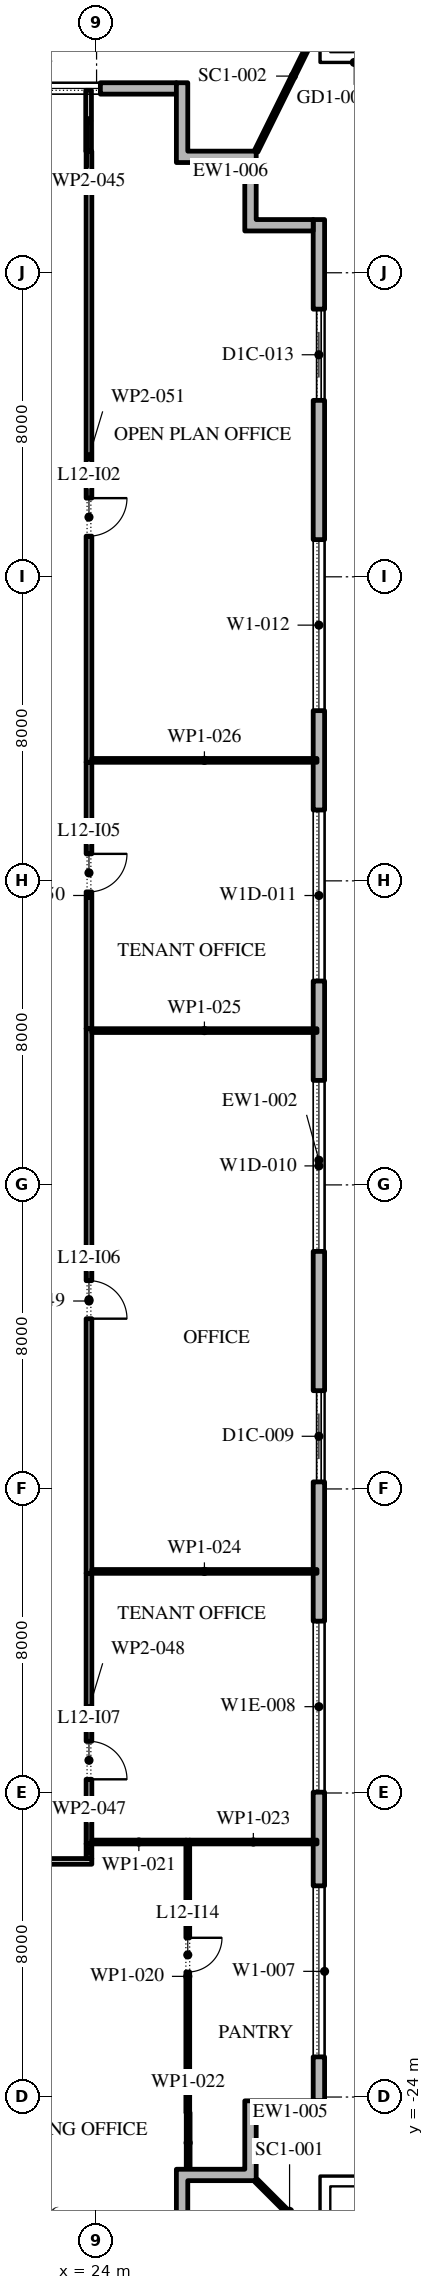
"""IFC4 building model, lengths in metres.
Left out: names, types, materials, properties, quantities, classifications, styles, units other than length and angle.
Written with IfcOpenShell. Run it as: python <this file> out.ifc"""

import sys

from ifc_helpers import new_model, si_unit, direction, frame, frame_2d, origin, place, context, subcontext, project, spatial, polyline, rectangle, outline, extrude, element, fill, save


model = new_model("IFC4")
c1 = context("Model", 3, precision=1e-05, world=origin(), true_north=direction((0.0, 1.0)))
c2 = subcontext(c1, "Body", "Model", "MODEL_VIEW")
j1 = project(units=[si_unit("LENGTHUNIT", "METRE"), si_unit("PLANEANGLEUNIT", "RADIAN")], contexts=[c1])
p1 = place(None, origin())
s1 = spatial("IfcSite", under=j1, at=p1, CompositionType="ELEMENT")
p2 = place(p1, origin())
s2 = spatial("IfcBuilding", under=s1, at=p2, CompositionType="ELEMENT")
p3 = place(p2, frame((0.0, 0.0, 60.6)))
s3 = spatial("IfcBuildingStorey", under=s2, at=p3, CompositionType="ELEMENT", Elevation=60.6)
p4 = place(p3, frame((29.85, -24.1, 0.0), z_axis=(0.0, 0.0, 1.0), x_axis=(0.0, 1.0, 0.0)))
e1 = element("IfcWall", 1, at=p4, inside=s3, PredefinedType="STANDARD", context=c2, shape_type="SweptSolid", body=[
    extrude(rectangle(XDim=49.5, YDim=0.3, at=frame_2d((24.75, 0.0))), origin(), (0.0, 0.0, 1.0), 4.0),
])
p5 = place(p4, frame((1.157, 0.0, 0.45)))
e2 = element("IfcOpeningElement", 2, at=p5, cuts=e1, PredefinedType="OPENING", context=c2, shape_type="SweptSolid", body=[
    extrude(rectangle(XDim=4.5, YDim=3.05, at=frame_2d((2.25, 1.525))), frame((0.0, 0.16, 0.0), z_axis=(0.0, -1.0, 0.0), x_axis=(1.0, 0.0, 0.0)), (0.0, 0.0, 1.0), 0.32),
])
p6 = place(p4, frame((8.121, 0.0, 0.45)))
e3 = element("IfcOpeningElement", 3, at=p6, cuts=e1, PredefinedType="OPENING", context=c2, shape_type="SweptSolid", body=[
    extrude(rectangle(XDim=4.5, YDim=2.825, at=frame_2d((2.25, 1.413))), frame((0.0, 0.16, 0.0), z_axis=(0.0, -1.0, 0.0), x_axis=(1.0, 0.0, 0.0)), (0.0, 0.0, 1.0), 0.32),
])
p7 = place(p4, frame((16.286, 0.0, 0.0)))
e4 = element("IfcOpeningElement", 4, at=p7, cuts=e1, PredefinedType="OPENING", context=c2, shape_type="SweptSolid", body=[
    extrude(rectangle(XDim=2.4, YDim=3.325, at=frame_2d((1.2, 1.663))), frame((0.0, 0.16, 0.0), z_axis=(0.0, -1.0, 0.0), x_axis=(1.0, 0.0, 0.0)), (0.0, 0.0, 1.0), 0.32),
])
p8 = place(p4, frame((22.35, 0.0, 0.45)))
e5 = element("IfcOpeningElement", 5, at=p8, cuts=e1, PredefinedType="OPENING", context=c2, shape_type="SweptSolid", body=[
    extrude(rectangle(XDim=4.5, YDim=2.875, at=frame_2d((2.25, 1.438))), frame((0.0, 0.16, 0.0), z_axis=(0.0, -1.0, 0.0), x_axis=(1.0, 0.0, 0.0)), (0.0, 0.0, 1.0), 0.32),
])
p9 = place(p4, frame((29.464, 0.0, 0.45)))
e6 = element("IfcOpeningElement", 6, at=p9, cuts=e1, PredefinedType="OPENING", context=c2, shape_type="SweptSolid", body=[
    extrude(rectangle(XDim=4.5, YDim=2.875, at=frame_2d((2.25, 1.438))), frame((0.0, 0.16, 0.0), z_axis=(0.0, -1.0, 0.0), x_axis=(1.0, 0.0, 0.0)), (0.0, 0.0, 1.0), 0.32),
])
p10 = place(p4, frame((36.579, 0.0, 0.45)))
e7 = element("IfcOpeningElement", 7, at=p10, cuts=e1, PredefinedType="OPENING", context=c2, shape_type="SweptSolid", body=[
    extrude(rectangle(XDim=4.5, YDim=3.05, at=frame_2d((2.25, 1.525))), frame((0.0, 0.16, 0.0), z_axis=(0.0, -1.0, 0.0), x_axis=(1.0, 0.0, 0.0)), (0.0, 0.0, 1.0), 0.32),
])
p11 = place(p4, frame((44.743, 0.0, 0.0)))
e8 = element("IfcOpeningElement", 8, at=p11, cuts=e1, PredefinedType="OPENING", context=c2, shape_type="SweptSolid", body=[
    extrude(rectangle(XDim=2.4, YDim=3.325, at=frame_2d((1.2, 1.663))), frame((0.0, 0.16, 0.0), z_axis=(0.0, -1.0, 0.0), x_axis=(1.0, 0.0, 0.0)), (0.0, 0.0, 1.0), 0.32),
])
p12 = place(p3, frame((26.1, 28.85, 0.0), z_axis=(0.0, 0.0, 1.0), x_axis=(-1.0, 0.0, 0.0)))
e9 = element("IfcWall", 9, at=p12, inside=s3, PredefinedType="STANDARD", context=c2, shape_type="SweptSolid", body=[
    extrude(rectangle(XDim=52.5, YDim=0.3, at=frame_2d((26.25, 0.0))), origin(), (0.0, 0.0, 1.0), 4.0),
])
p13 = place(p12, frame((2.0, 0.0, 0.45)))
e10 = element("IfcOpeningElement", 10, at=p13, cuts=e9, PredefinedType="OPENING", context=c2, shape_type="SweptSolid", body=[
    extrude(rectangle(XDim=4.5, YDim=3.0, at=frame_2d((2.25, 1.5))), frame((0.0, 0.16, 0.0), z_axis=(0.0, -1.0, 0.0), x_axis=(1.0, 0.0, 0.0)), (0.0, 0.0, 1.0), 0.32),
])
p14 = place(p12, frame((10.65, 0.0, 0.45)))
e11 = element("IfcOpeningElement", 11, at=p14, cuts=e9, PredefinedType="OPENING", context=c2, shape_type="SweptSolid", body=[
    extrude(rectangle(XDim=4.5, YDim=3.0, at=frame_2d((2.25, 1.5))), frame((0.0, 0.16, 0.0), z_axis=(0.0, -1.0, 0.0), x_axis=(1.0, 0.0, 0.0)), (0.0, 0.0, 1.0), 0.32),
])
p15 = place(p12, frame((20.5, 0.0, 0.0)))
e12 = element("IfcOpeningElement", 12, at=p15, cuts=e9, PredefinedType="OPENING", context=c2, shape_type="SweptSolid", body=[
    extrude(rectangle(XDim=2.4, YDim=3.5, at=frame_2d((1.2, 1.75))), frame((0.0, 0.16, 0.0), z_axis=(0.0, -1.0, 0.0), x_axis=(1.0, 0.0, 0.0)), (0.0, 0.0, 1.0), 0.32),
])
p16 = place(p12, frame((28.25, 0.0, 0.45)))
e13 = element("IfcOpeningElement", 13, at=p16, cuts=e9, PredefinedType="OPENING", context=c2, shape_type="SweptSolid", body=[
    extrude(rectangle(XDim=4.5, YDim=3.0, at=frame_2d((2.25, 1.5))), frame((0.0, 0.16, 0.0), z_axis=(0.0, -1.0, 0.0), x_axis=(1.0, 0.0, 0.0)), (0.0, 0.0, 1.0), 0.32),
])
p17 = place(p12, frame((37.05, 0.0, 0.45)))
e14 = element("IfcOpeningElement", 14, at=p17, cuts=e9, PredefinedType="OPENING", context=c2, shape_type="SweptSolid", body=[
    extrude(rectangle(XDim=4.5, YDim=3.0, at=frame_2d((2.25, 1.5))), frame((0.0, 0.16, 0.0), z_axis=(0.0, -1.0, 0.0), x_axis=(1.0, 0.0, 0.0)), (0.0, 0.0, 1.0), 0.32),
])
p18 = place(p12, frame((45.85, 0.0, 0.45)))
e15 = element("IfcOpeningElement", 15, at=p18, cuts=e9, PredefinedType="OPENING", context=c2, shape_type="SweptSolid", body=[
    extrude(rectangle(XDim=4.5, YDim=3.0, at=frame_2d((2.25, 1.5))), frame((0.0, 0.16, 0.0), z_axis=(0.0, -1.0, 0.0), x_axis=(1.0, 0.0, 0.0)), (0.0, 0.0, 1.0), 0.32),
])
p19 = place(p3, origin())
e16 = element("IfcWall", 16, at=p19, inside=s3, PredefinedType="STANDARD", context=c2, shape_type="SweptSolid", body=[
    extrude(outline(polyline([(27.9, -25.9), (27.9, -24.1), (30.0, -24.1), (30.0, -24.4), (28.2, -24.4), (28.2, -26.2), (26.4, -26.2), (26.4, -27.7), (26.1, -27.7), (26.1, -25.9), (27.9, -25.9)])), origin(), (0.0, 0.0, 1.0), 4.0),
])
p20 = place(p3, origin())
e17 = element("IfcWall", 17, at=p20, inside=s3, PredefinedType="STANDARD", context=c2, shape_type="SweptSolid", body=[
    extrude(outline(polyline([(27.9, 26.9), (26.1, 26.9), (26.1, 29.0), (26.4, 29.0), (26.4, 27.2), (28.2, 27.2), (28.2, 25.4), (29.7, 25.4), (29.7, 25.1), (27.9, 25.1), (27.9, 26.9)])), origin(), (0.0, 0.0, 1.0), 4.0),
])
p21 = place(p3, frame((28.2, -26.2, -0.05), z_axis=(0.0, 0.0, 1.0), x_axis=(0.707106781187, -0.707106781187, 0.0)))
e18 = element("IfcWall", 18, at=p21, inside=s3, PredefinedType="STANDARD", context=c2, shape_type="SweptSolid", body=[
    extrude(rectangle(XDim=2.385, YDim=0.1, at=frame_2d((1.192, 0.0))), origin(), (0.0, 0.0, 1.0), 4.05),
])
p22 = place(p3, frame((28.2, 27.2, -0.05), z_axis=(0.0, 0.0, 1.0), x_axis=(0.443174643924, 0.896435293249, 0.0)))
e19 = element("IfcWall", 19, at=p22, inside=s3, PredefinedType="STANDARD", context=c2, shape_type="SweptSolid", body=[
    extrude(rectangle(XDim=4.406, YDim=0.1, at=frame_2d((2.203, 0.0))), origin(), (0.0, 0.0, 1.0), 4.05),
])
p23 = place(p3, frame((23.79, 28.8, 0.0), z_axis=(0.0, 0.0, 1.0), x_axis=(0.0, -1.0, 0.0)))
e20 = element("IfcWall", 20, at=p23, inside=s3, PredefinedType="PARTITIONING", context=c2, shape_type="SweptSolid", body=[
    extrude(rectangle(XDim=1.6, YDim=0.15, at=frame_2d((0.8, 0.0))), origin(), (0.0, 0.0, 1.0), 4.0),
])
p24 = place(p3, frame((23.875, -17.8, 0.0), z_axis=(0.0, 0.0, 1.0), x_axis=(-1.0, 0.0, 0.0)))
e21 = element("IfcWall", 21, at=p24, inside=s3, PredefinedType="PARTITIONING", context=c2, shape_type="SweptSolid", body=[
    extrude(rectangle(XDim=6.225, YDim=0.15, at=frame_2d((3.113, 0.0))), origin(), (0.0, 0.0, 1.0), 4.0),
])
p25 = place(p24, frame((2.125, 0.0, 0.0)))
e22 = element("IfcOpeningElement", 22, at=p25, cuts=e21, PredefinedType="OPENING", context=c2, shape_type="SweptSolid", body=[
    extrude(rectangle(XDim=1.0, YDim=2.1, at=frame_2d((0.5, 1.05))), frame((0.0, 0.085, 0.0), z_axis=(0.0, -1.0, 0.0), x_axis=(1.0, 0.0, 0.0)), (0.0, 0.0, 1.0), 0.17),
])
p26 = place(p3, frame((23.8, -17.34, 0.0), z_axis=(0.0, 0.0, 1.0), x_axis=(0.0, -1.0, 0.0)))
e23 = element("IfcWall", 23, at=p26, inside=s3, PredefinedType="PARTITIONING", context=c2, shape_type="SweptSolid", body=[
    extrude(rectangle(XDim=0.385, YDim=0.15, at=frame_2d((0.192, 0.0))), origin(), (0.0, 0.0, 1.0), 4.0),
])
p27 = place(p3, frame((23.8, -10.22, 0.0), z_axis=(0.0, 0.0, 1.0), x_axis=(0.0, -1.0, 0.0)))
e24 = element("IfcWall", 24, at=p27, inside=s3, PredefinedType="PARTITIONING", context=c2, shape_type="SweptSolid", body=[
    extrude(rectangle(XDim=7.12, YDim=0.15, at=frame_2d((3.56, 0.0))), origin(), (0.0, 0.0, 1.0), 4.0),
])
p28 = place(p27, frame((4.42, 0.0, 0.0)))
e25 = element("IfcOpeningElement", 25, at=p28, cuts=e24, PredefinedType="OPENING", context=c2, shape_type="SweptSolid", body=[
    extrude(rectangle(XDim=1.0, YDim=2.1, at=frame_2d((0.5, 1.05))), frame((0.0, 0.085, 0.0), z_axis=(0.0, -1.0, 0.0), x_axis=(1.0, 0.0, 0.0)), (0.0, 0.0, 1.0), 0.17),
])
p29 = place(p3, frame((23.8, 4.11, 0.0), z_axis=(0.0, 0.0, 1.0), x_axis=(0.0, -1.0, 0.0)))
e26 = element("IfcWall", 26, at=p29, inside=s3, PredefinedType="PARTITIONING", context=c2, shape_type="SweptSolid", body=[
    extrude(rectangle(XDim=14.33, YDim=0.15, at=frame_2d((7.165, 0.0))), origin(), (0.0, 0.0, 1.0), 4.0),
])
p30 = place(p29, frame((6.63, 0.0, 0.0)))
e27 = element("IfcOpeningElement", 27, at=p30, cuts=e26, PredefinedType="OPENING", context=c2, shape_type="SweptSolid", body=[
    extrude(rectangle(XDim=1.0, YDim=2.1, at=frame_2d((0.5, 1.05))), frame((0.0, 0.085, 0.0), z_axis=(0.0, -1.0, 0.0), x_axis=(1.0, 0.0, 0.0)), (0.0, 0.0, 1.0), 0.17),
])
p31 = place(p3, frame((23.8, 11.12, 0.0), z_axis=(0.0, 0.0, 1.0), x_axis=(0.0, -1.0, 0.0)))
e28 = element("IfcWall", 28, at=p31, inside=s3, PredefinedType="PARTITIONING", context=c2, shape_type="SweptSolid", body=[
    extrude(rectangle(XDim=7.01, YDim=0.15, at=frame_2d((3.505, 0.0))), origin(), (0.0, 0.0, 1.0), 4.0),
])
p32 = place(p31, frame((2.41, 0.0, 0.0)))
e29 = element("IfcOpeningElement", 29, at=p32, cuts=e28, PredefinedType="OPENING", context=c2, shape_type="SweptSolid", body=[
    extrude(rectangle(XDim=1.0, YDim=2.1, at=frame_2d((0.5, 1.05))), frame((0.0, 0.085, 0.0), z_axis=(0.0, -1.0, 0.0), x_axis=(1.0, 0.0, 0.0)), (0.0, 0.0, 1.0), 0.17),
])
p33 = place(p3, frame((23.8, 27.2, 0.0), z_axis=(0.0, 0.0, 1.0), x_axis=(0.0, -1.0, 0.0)))
e30 = element("IfcWall", 30, at=p33, inside=s3, PredefinedType="PARTITIONING", context=c2, shape_type="SweptSolid", body=[
    extrude(rectangle(XDim=16.08, YDim=0.15, at=frame_2d((8.04, 0.0))), origin(), (0.0, 0.0, 1.0), 4.0),
])
p34 = place(p33, frame((9.13, 0.0, 0.0)))
e31 = element("IfcOpeningElement", 31, at=p34, cuts=e30, PredefinedType="OPENING", context=c2, shape_type="SweptSolid", body=[
    extrude(rectangle(XDim=1.0, YDim=2.1, at=frame_2d((0.5, 1.05))), frame((0.0, 0.085, 0.0), z_axis=(0.0, -1.0, 0.0), x_axis=(1.0, 0.0, 0.0)), (0.0, 0.0, 1.0), 0.17),
])
p35 = place(p3, frame((26.4, -24.41, 0.0), z_axis=(0.0, 0.0, 1.0), x_axis=(0.0, 1.0, 0.0)))
e32 = element("IfcWall", 32, at=p35, inside=s3, PredefinedType="PARTITIONING", context=c2, shape_type="SweptSolid", body=[
    extrude(rectangle(XDim=7.17, YDim=0.1, at=frame_2d((3.585, 0.0))), origin(), (0.0, 0.0, 1.0), 4.0),
])
p36 = place(p35, frame((3.7, 0.0, 0.0)))
e33 = element("IfcOpeningElement", 33, at=p36, cuts=e32, PredefinedType="OPENING", context=c2, shape_type="SweptSolid", body=[
    extrude(rectangle(XDim=0.9, YDim=2.1, at=frame_2d((0.45, 1.05))), frame((0.0, 0.06, 0.0), z_axis=(0.0, -1.0, 0.0), x_axis=(1.0, 0.0, 0.0)), (0.0, 0.0, 1.0), 0.12),
])
p37 = place(p3, frame((26.35, -17.29, 0.0), z_axis=(0.0, 0.0, 1.0), x_axis=(-1.0, 0.0, 0.0)))
e34 = element("IfcWall", 34, at=p37, inside=s3, PredefinedType="PARTITIONING", context=c2, shape_type="SweptSolid", body=[
    extrude(rectangle(XDim=2.475, YDim=0.1, at=frame_2d((1.238, 0.0))), origin(), (0.0, 0.0, 1.0), 4.0),
])
p38 = place(p3, frame((26.41, -26.0, 0.0), z_axis=(0.0, 0.0, 1.0), x_axis=(0.0, 1.0, 0.0)))
e35 = element("IfcWall", 35, at=p38, inside=s3, PredefinedType="PARTITIONING", context=c2, shape_type="SweptSolid", body=[
    extrude(rectangle(XDim=1.59, YDim=0.1, at=frame_2d((0.795, 0.0))), origin(), (0.0, 0.0, 1.0), 4.0),
])
p39 = place(p3, frame((29.8, -17.29, 0.0), z_axis=(0.0, 0.0, 1.0), x_axis=(-1.0, 0.0, 0.0)))
e36 = element("IfcWall", 36, at=p39, inside=s3, PredefinedType="PARTITIONING", context=c2, shape_type="SweptSolid", body=[
    extrude(rectangle(XDim=3.35, YDim=0.1, at=frame_2d((1.675, 0.0))), origin(), (0.0, 0.0, 1.0), 4.0),
])
for number, where, z_axis, x_axis in (
    (37, (29.8, -10.17, 0.0), (0.0, 0.0, 1.0), (-1.0, 0.0, 0.0)),
    (38, (29.8, 4.06, 0.0), (0.0, 0.0, 1.0), (-1.0, 0.0, 0.0)),
    (39, (29.8, 11.17, 0.0), (0.0, 0.0, 1.0), (-1.0, 0.0, 0.0)),
):
    element("IfcWall", number, at=place(p3, frame(where, z_axis=z_axis, x_axis=x_axis)), inside=s3, PredefinedType="PARTITIONING", context=c2, shape_type="SweptSolid", body=[
        extrude(rectangle(XDim=5.925, YDim=0.1, at=frame_2d((2.962, 0.0))), origin(), (0.0, 0.0, 1.0), 4.0),
    ])
p40 = place(p5, origin())
e40 = element("IfcWindow", 40, at=p40, inside=s3, PartitioningType="DOUBLE_PANEL_VERTICAL", PredefinedType="WINDOW", context=c2, shape_type="SweptSolid", body=[
    extrude(rectangle(XDim=4.5, YDim=3.05, at=frame_2d((2.25, 1.525))), frame((0.0, 0.03, 0.0), z_axis=(0.0, -1.0, 0.0), x_axis=(1.0, 0.0, 0.0)), (0.0, 0.0, 1.0), 0.06),
])
fill(e2, e40)
p41 = place(p6, origin())
e41 = element("IfcWindow", 41, at=p41, inside=s3, PartitioningType="DOUBLE_PANEL_VERTICAL", PredefinedType="WINDOW", context=c2, shape_type="SweptSolid", body=[
    extrude(rectangle(XDim=4.5, YDim=2.825, at=frame_2d((2.25, 1.413))), frame((0.0, 0.03, 0.0), z_axis=(0.0, -1.0, 0.0), x_axis=(1.0, 0.0, 0.0)), (0.0, 0.0, 1.0), 0.06),
])
fill(e3, e41)
p42 = place(p7, origin())
e42 = element("IfcDoor", 42, at=p42, inside=s3, OperationType="DOUBLE_DOOR_SLIDING", PredefinedType="DOOR", context=c2, shape_type="SweptSolid", body=[
    extrude(rectangle(XDim=2.4, YDim=3.325, at=frame_2d((1.2, 1.663))), frame((0.0, 0.025, 0.0), z_axis=(0.0, -1.0, 0.0), x_axis=(1.0, 0.0, 0.0)), (0.0, 0.0, 1.0), 0.05),
])
fill(e4, e42)
p43 = place(p8, origin())
e43 = element("IfcWindow", 43, at=p43, inside=s3, PartitioningType="DOUBLE_PANEL_VERTICAL", PredefinedType="WINDOW", context=c2, shape_type="SweptSolid", body=[
    extrude(rectangle(XDim=4.5, YDim=2.875, at=frame_2d((2.25, 1.438))), frame((0.0, 0.03, 0.0), z_axis=(0.0, -1.0, 0.0), x_axis=(1.0, 0.0, 0.0)), (0.0, 0.0, 1.0), 0.06),
])
fill(e5, e43)
p44 = place(p9, origin())
e44 = element("IfcWindow", 44, at=p44, inside=s3, PartitioningType="DOUBLE_PANEL_VERTICAL", PredefinedType="WINDOW", context=c2, shape_type="SweptSolid", body=[
    extrude(rectangle(XDim=4.5, YDim=2.875, at=frame_2d((2.25, 1.438))), frame((0.0, 0.03, 0.0), z_axis=(0.0, -1.0, 0.0), x_axis=(1.0, 0.0, 0.0)), (0.0, 0.0, 1.0), 0.06),
])
fill(e6, e44)
p45 = place(p10, origin())
e45 = element("IfcWindow", 45, at=p45, inside=s3, PartitioningType="DOUBLE_PANEL_VERTICAL", PredefinedType="WINDOW", context=c2, shape_type="SweptSolid", body=[
    extrude(rectangle(XDim=4.5, YDim=3.05, at=frame_2d((2.25, 1.525))), frame((0.0, 0.03, 0.0), z_axis=(0.0, -1.0, 0.0), x_axis=(1.0, 0.0, 0.0)), (0.0, 0.0, 1.0), 0.06),
])
fill(e7, e45)
p46 = place(p11, origin())
e46 = element("IfcDoor", 46, at=p46, inside=s3, OperationType="DOUBLE_DOOR_SLIDING", PredefinedType="DOOR", context=c2, shape_type="SweptSolid", body=[
    extrude(rectangle(XDim=2.4, YDim=3.325, at=frame_2d((1.2, 1.663))), frame((0.0, 0.025, 0.0), z_axis=(0.0, -1.0, 0.0), x_axis=(1.0, 0.0, 0.0)), (0.0, 0.0, 1.0), 0.05),
])
fill(e8, e46)
p47 = place(p13, origin())
e47 = element("IfcWindow", 47, at=p47, inside=s3, PartitioningType="DOUBLE_PANEL_VERTICAL", PredefinedType="WINDOW", context=c2, shape_type="SweptSolid", body=[
    extrude(rectangle(XDim=4.5, YDim=3.0, at=frame_2d((2.25, 1.5))), frame((0.0, 0.03, 0.0), z_axis=(0.0, -1.0, 0.0), x_axis=(1.0, 0.0, 0.0)), (0.0, 0.0, 1.0), 0.06),
])
fill(e10, e47)
p48 = place(p34, origin())
e48 = element("IfcDoor", 48, at=p48, inside=s3, OperationType="SINGLE_SWING_RIGHT", PredefinedType="DOOR", context=c2, shape_type="SweptSolid", body=[
    extrude(rectangle(XDim=1.0, YDim=2.1, at=frame_2d((0.5, 1.05))), frame((0.0, 0.025, 0.0), z_axis=(0.0, -1.0, 0.0), x_axis=(1.0, 0.0, 0.0)), (0.0, 0.0, 1.0), 0.05),
])
fill(e31, e48)
p49 = place(p32, origin())
e49 = element("IfcDoor", 49, at=p49, inside=s3, OperationType="SINGLE_SWING_RIGHT", PredefinedType="DOOR", context=c2, shape_type="SweptSolid", body=[
    extrude(rectangle(XDim=1.0, YDim=2.1, at=frame_2d((0.5, 1.05))), frame((0.0, 0.025, 0.0), z_axis=(0.0, -1.0, 0.0), x_axis=(1.0, 0.0, 0.0)), (0.0, 0.0, 1.0), 0.05),
])
fill(e29, e49)
p50 = place(p30, origin())
e50 = element("IfcDoor", 50, at=p50, inside=s3, OperationType="SINGLE_SWING_LEFT", PredefinedType="DOOR", context=c2, shape_type="SweptSolid", body=[
    extrude(rectangle(XDim=1.0, YDim=2.1, at=frame_2d((0.5, 1.05))), frame((0.0, 0.025, 0.0), z_axis=(0.0, -1.0, 0.0), x_axis=(1.0, 0.0, 0.0)), (0.0, 0.0, 1.0), 0.05),
])
fill(e27, e50)
p51 = place(p28, origin())
e51 = element("IfcDoor", 51, at=p51, inside=s3, OperationType="SINGLE_SWING_LEFT", PredefinedType="DOOR", context=c2, shape_type="SweptSolid", body=[
    extrude(rectangle(XDim=1.0, YDim=2.1, at=frame_2d((0.5, 1.05))), frame((0.0, 0.025, 0.0), z_axis=(0.0, -1.0, 0.0), x_axis=(1.0, 0.0, 0.0)), (0.0, 0.0, 1.0), 0.05),
])
fill(e25, e51)
p52 = place(p36, frame((0.9, 0.0, 0.0), z_axis=(0.0, 0.0, 1.0), x_axis=(-1.0, 0.0, 0.0)))
e52 = element("IfcDoor", 52, at=p52, inside=s3, OperationType="SINGLE_SWING_RIGHT", PredefinedType="DOOR", context=c2, shape_type="SweptSolid", body=[
    extrude(rectangle(XDim=0.9, YDim=2.1, at=frame_2d((0.45, 1.05))), frame((0.0, 0.025, 0.0), z_axis=(0.0, -1.0, 0.0), x_axis=(1.0, 0.0, 0.0)), (0.0, 0.0, 1.0), 0.05),
])
fill(e33, e52)
save(model, sys.argv[1])
